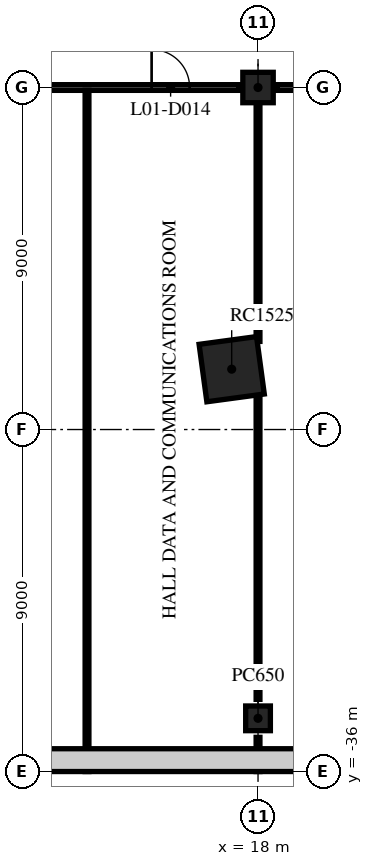
"""IFC4 building model, lengths in metres.
Left out: names, types, materials, properties, quantities, classifications, styles, units other than length and angle.
Written with IfcOpenShell. Run it as: python <this file> out.ifc"""

import sys

from ifc_helpers import new_model, si_unit, direction, frame, frame_2d, origin, origin_2d, place, context, subcontext, project, spatial, rectangle, extrude, element, fill, save


model = new_model("IFC4")
c1 = context("Model", 3, precision=1e-05, world=origin(), true_north=direction((0.0, 1.0)))
c2 = subcontext(c1, "Body", "Model", "MODEL_VIEW")
j1 = project(units=[si_unit("LENGTHUNIT", "METRE"), si_unit("PLANEANGLEUNIT", "RADIAN")], contexts=[c1])
p1 = place(None, origin())
s1 = spatial("IfcSite", under=j1, at=p1, CompositionType="ELEMENT")
p2 = place(p1, origin())
s2 = spatial("IfcBuilding", under=s1, at=p2, CompositionType="ELEMENT")
p3 = place(p2, frame((0.0, 0.0, 4.5)))
s3 = spatial("IfcBuildingStorey", under=s2, at=p3, CompositionType="ELEMENT", Elevation=4.5)
p4 = place(p3, frame((18.0, -34.6, 0.0), z_axis=(0.0, 0.0, 1.0), x_axis=(1.0, 0.0, 0.0)))
e1 = element("IfcColumn", 1, at=p4, inside=s3, PredefinedType="COLUMN", context=c2, shape_type="SweptSolid", body=[
    extrude(rectangle(XDim=0.65, YDim=0.65, at=origin_2d()), origin(), (0.0, 0.0, 1.0), 4.5),
])
p5 = place(p3, frame((18.0, -18.0, 0.0), z_axis=(0.0, 0.0, 1.0), x_axis=(1.0, 0.0, 0.0)))
e2 = element("IfcColumn", 2, at=p5, inside=s3, PredefinedType="COLUMN", context=c2, shape_type="SweptSolid", body=[
    extrude(rectangle(XDim=0.8, YDim=0.8, at=origin_2d()), origin(), (0.0, 0.0, 1.0), 4.5),
])
p6 = place(p3, frame((17.307, -25.412, 0.0), z_axis=(0.0, 0.0, 1.0), x_axis=(0.991001197216, 0.133853005627, 0.0)))
e3 = element("IfcColumn", 3, at=p6, inside=s3, PredefinedType="COLUMN", context=c2, shape_type="SweptSolid", body=[
    extrude(rectangle(XDim=1.525, YDim=1.525, at=origin_2d()), origin(), (0.0, 0.0, 1.0), 4.5),
])
p7 = place(p3, frame((9.5, -18.0, 0.0), z_axis=(0.0, 0.0, 1.0), x_axis=(1.0, 0.0, 0.0)))
e4 = element("IfcWall", 4, at=p7, inside=s3, PredefinedType="PARTITIONING", context=c2, shape_type="SweptSolid", body=[
    extrude(rectangle(XDim=8.0, YDim=0.15, at=frame_2d((4.0, 0.0))), origin(), (0.0, 0.0, 1.0), 4.1),
])
p8 = place(p7, frame((5.7, 0.0, 0.0)))
e5 = element("IfcOpeningElement", 5, at=p8, cuts=e4, PredefinedType="OPENING", context=c2, shape_type="SweptSolid", body=[
    extrude(rectangle(XDim=1.0, YDim=2.1, at=frame_2d((0.5, 1.05))), frame((0.0, 0.085, 0.0), z_axis=(0.0, -1.0, 0.0), x_axis=(1.0, 0.0, 0.0)), (0.0, 0.0, 1.0), 0.17),
])
p9 = place(p3, frame((18.5, -18.0, 0.0), z_axis=(0.0, 0.0, 1.0), x_axis=(1.0, 0.0, 0.0)))
e6 = element("IfcWall", 6, at=p9, inside=s3, PredefinedType="PARTITIONING", context=c2, shape_type="SweptSolid", body=[
    extrude(rectangle(XDim=8.0, YDim=0.15, at=frame_2d((4.0, 0.0))), origin(), (0.0, 0.0, 1.0), 4.1),
])
p10 = place(p9, frame((6.6, 0.0, 0.0)))
e7 = element("IfcOpeningElement", 7, at=p10, cuts=e6, PredefinedType="OPENING", context=c2, shape_type="SweptSolid", body=[
    extrude(rectangle(XDim=1.0, YDim=2.1, at=frame_2d((0.5, 1.05))), frame((0.0, 0.085, 0.0), z_axis=(0.0, -1.0, 0.0), x_axis=(1.0, 0.0, 0.0)), (0.0, 0.0, 1.0), 0.17),
])
p11 = place(p3, frame((13.5, -36.0, 0.0), z_axis=(0.0, 0.0, 1.0), x_axis=(0.0, 1.0, 0.0)))
e8 = element("IfcWall", 8, at=p11, inside=s3, PredefinedType="PARTITIONING", context=c2, shape_type="SweptSolid", body=[
    extrude(rectangle(XDim=17.925, YDim=0.1, at=frame_2d((8.962, 0.0))), origin(), (0.0, 0.0, 1.0), 4.1),
])
p12 = place(p3, frame((18.0, -36.0, 0.0), z_axis=(0.0, 0.0, 1.0), x_axis=(0.0, 1.0, 0.0)))
e9 = element("IfcWall", 9, at=p12, inside=s3, PredefinedType="PARTITIONING", context=c2, shape_type="SweptSolid", body=[
    extrude(rectangle(XDim=0.9, YDim=0.1, at=frame_2d((0.45, 0.0))), origin(), (0.0, 0.0, 1.0), 4.1),
])
p13 = place(p3, frame((18.0, -34.1, 0.0), z_axis=(0.0, 0.0, 1.0), x_axis=(0.0, 1.0, 0.0)))
e10 = element("IfcWall", 10, at=p13, inside=s3, PredefinedType="PARTITIONING", context=c2, shape_type="SweptSolid", body=[
    extrude(rectangle(XDim=7.957, YDim=0.1, at=frame_2d((3.979, 0.0))), origin(), (0.0, 0.0, 1.0), 4.1),
])
p14 = place(p3, frame((18.0, -24.681, 0.0), z_axis=(0.0, 0.0, 1.0), x_axis=(0.0, 1.0, 0.0)))
e11 = element("IfcWall", 11, at=p14, inside=s3, PredefinedType="PARTITIONING", context=c2, shape_type="SweptSolid", body=[
    extrude(rectangle(XDim=6.181, YDim=0.1, at=frame_2d((3.09, 0.0))), origin(), (0.0, 0.0, 1.0), 4.1),
])
p15 = place(p3, frame((11.95, -36.45, 0.0), z_axis=(0.0, 0.0, 1.0), x_axis=(1.0, 0.0, 0.0)))
e12 = element("IfcWall", 12, at=p15, inside=s3, PredefinedType="SOLIDWALL", context=c2, shape_type="SweptSolid", body=[
    extrude(rectangle(XDim=7.417, YDim=0.6, at=frame_2d((3.708, 0.0))), origin(), (0.0, 0.0, 1.0), 4.15),
])
p16 = place(p3, frame((-30.876, -35.7, 0.0), z_axis=(0.0, 0.0, 1.0), x_axis=(1.0, 0.0, 0.0)))
e13 = element("IfcWall", 13, at=p16, inside=s3, PredefinedType="STANDARD", context=c2, shape_type="SweptSolid", body=[
    extrude(rectangle(XDim=61.751, YDim=0.6, at=frame_2d((30.876, 0.0))), origin(), (0.0, 0.0, 1.0), 4.1),
])
p17 = place(p8, origin())
e14 = element("IfcDoor", 14, at=p17, inside=s3, OperationType="SINGLE_SWING_RIGHT", PredefinedType="DOOR", context=c2, shape_type="SweptSolid", body=[
    extrude(rectangle(XDim=1.0, YDim=2.1, at=frame_2d((0.5, 1.05))), frame((0.0, 0.025, 0.0), z_axis=(0.0, -1.0, 0.0), x_axis=(1.0, 0.0, 0.0)), (0.0, 0.0, 1.0), 0.05),
])
fill(e5, e14)
save(model, sys.argv[1])
